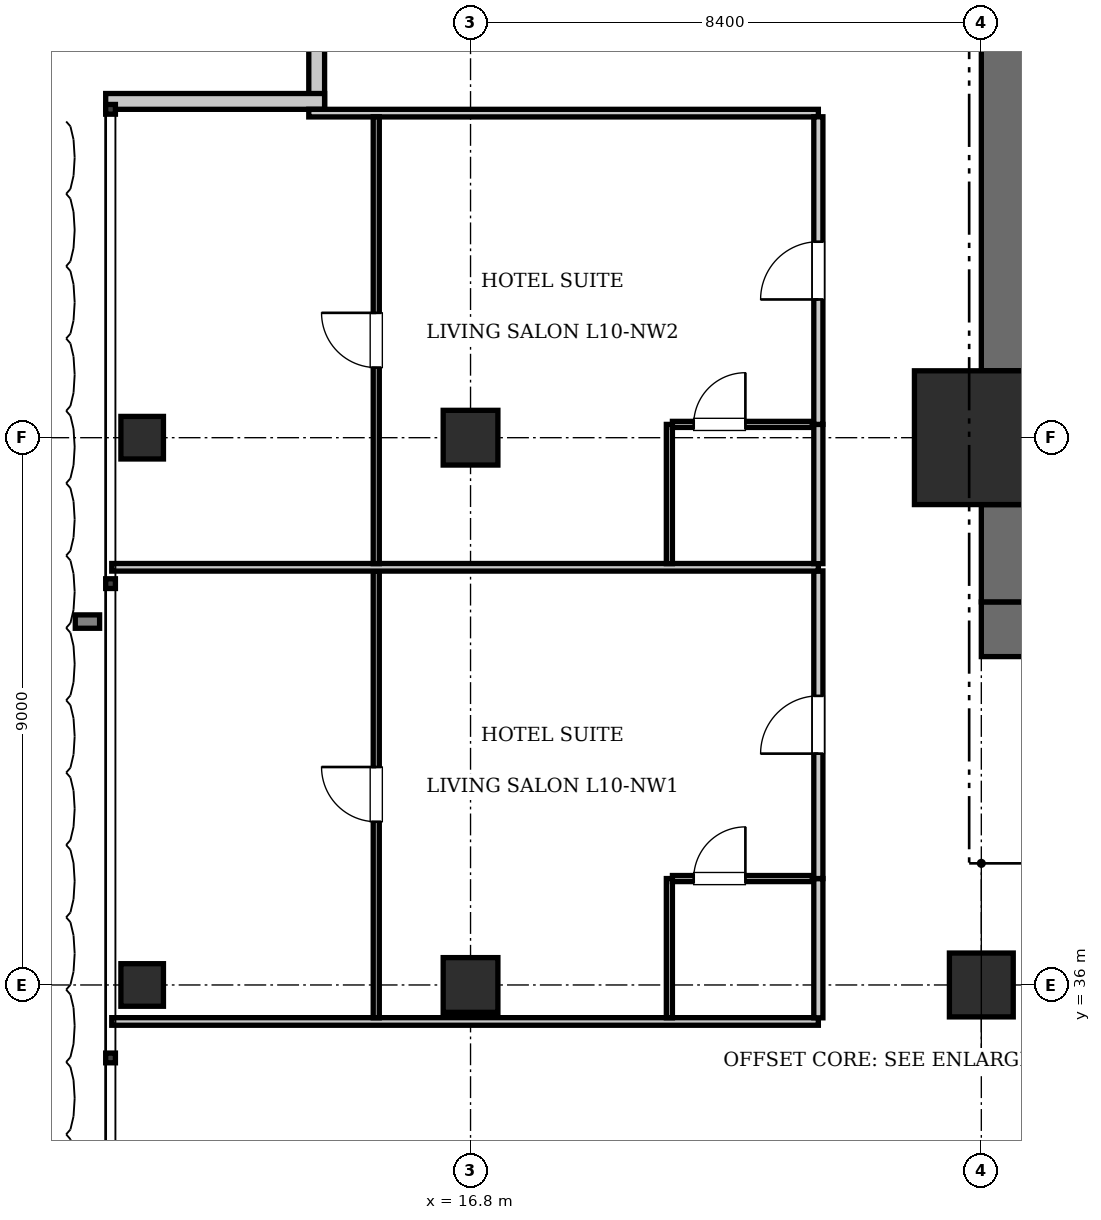
"""IFC4 building model, lengths in metres.
Left out: names, types, materials, properties, quantities, classifications, styles, units other than length and angle.
Written with IfcOpenShell. Run it as: python <this file> out.ifc"""

import sys

from ifc_helpers import new_model, si_unit, direction, frame, frame_2d, origin, origin_2d, place, context, subcontext, project, spatial, rectangle, i_section, extrude, element, fill, save


model = new_model("IFC4")
c1 = context("Model", 3, precision=1e-05, world=origin(), true_north=direction((0.0, 1.0)))
c2 = subcontext(c1, "Body", "Model", "MODEL_VIEW")
j1 = project(units=[si_unit("LENGTHUNIT", "METRE"), si_unit("PLANEANGLEUNIT", "RADIAN")], contexts=[c1])
p1 = place(None, origin())
s1 = spatial("IfcSite", under=j1, at=p1, CompositionType="ELEMENT")
p2 = place(p1, origin())
s2 = spatial("IfcBuilding", under=s1, at=p2, CompositionType="ELEMENT")
p3 = place(p2, frame((0.0, 0.0, 46.2)))
s3 = spatial("IfcBuildingStorey", under=s2, at=p3, CompositionType="ELEMENT", Elevation=46.2)
p4 = place(p3, frame((25.2, 45.0, 0.0), z_axis=(0.0, 0.0, 1.0), x_axis=(1.0, 0.0, 0.0)))
e1 = element("IfcColumn", 1, at=p4, inside=s3, PredefinedType="COLUMN", context=c2, shape_type="SweptSolid", body=[
    extrude(rectangle(XDim=2.2, YDim=2.2, at=origin_2d()), origin(), (0.0, 0.0, 1.0), 3.85),
])
p5 = place(p3, frame((25.2, 41.85, 0.0), z_axis=(0.0, 0.0, 1.0), x_axis=(1.0, 0.0, 0.0)))
e2 = element("IfcWall", 2, at=p5, inside=s3, PredefinedType="SHEAR", context=c2, shape_type="SweptSolid", body=[
    extrude(rectangle(XDim=6.8, YDim=0.9, at=frame_2d((3.4, 0.0))), origin(), (0.0, 0.0, 1.0), 3.85),
])
p6 = place(p5, frame((1.65, 0.0, 0.0)))
e3 = element("IfcOpeningElement", 3, at=p6, cuts=e2, PredefinedType="OPENING", context=c2, shape_type="SweptSolid", body=[
    extrude(rectangle(XDim=1.15, YDim=2.15, at=frame_2d((0.575, 1.075))), frame((0.0, 0.46, 0.0), z_axis=(0.0, -1.0, 0.0), x_axis=(1.0, 0.0, 0.0)), (0.0, 0.0, 1.0), 0.92),
])
p7 = place(p5, frame((5.15, 0.0, 0.0)))
e4 = element("IfcOpeningElement", 4, at=p7, cuts=e2, PredefinedType="OPENING", context=c2, shape_type="SweptSolid", body=[
    extrude(rectangle(XDim=1.1, YDim=2.2, at=frame_2d((0.55, 1.1))), frame((0.0, 0.46, 0.0), z_axis=(0.0, -1.0, 0.0), x_axis=(1.0, 0.0, 0.0)), (0.0, 0.0, 1.0), 0.92),
])
p8 = place(p3, frame((25.65, 42.3, 0.0), z_axis=(0.0, 0.0, 1.0), x_axis=(0.0, 1.0, 0.0)))
e5 = element("IfcWall", 5, at=p8, inside=s3, PredefinedType="SHEAR", context=c2, shape_type="SweptSolid", body=[
    extrude(rectangle(XDim=1.6, YDim=0.9, at=frame_2d((0.8, 0.0))), origin(), (0.0, 0.0, 1.0), 3.85),
])
p9 = place(p3, frame((25.65, 46.1, 0.0), z_axis=(0.0, 0.0, 1.0), x_axis=(0.0, 1.0, 0.0)))
e6 = element("IfcWall", 6, at=p9, inside=s3, PredefinedType="SHEAR", context=c2, shape_type="SweptSolid", body=[
    extrude(rectangle(XDim=7.0, YDim=0.9, at=frame_2d((3.5, 0.0))), origin(), (0.0, 0.0, 1.0), 3.85),
])
p10 = place(p3, frame((25.2, 36.0, 0.0), z_axis=(0.0, 0.0, 1.0), x_axis=(1.0, 0.0, 0.0)))
e7 = element("IfcColumn", 7, at=p10, inside=s3, PredefinedType="COLUMN", context=c2, shape_type="SweptSolid", body=[
    extrude(rectangle(XDim=1.05, YDim=1.05, at=origin_2d()), origin(), (0.0, 0.0, 1.0), 3.85),
])
for number, where, z_axis, x_axis in (
    (8, (16.8, 36.0, 0.0), (0.0, 0.0, 1.0), (1.0, 0.0, 0.0)),
    (9, (16.8, 45.0, 0.0), (0.0, 0.0, 1.0), (1.0, 0.0, 0.0)),
):
    element("IfcColumn", number, at=place(p3, frame(where, z_axis=z_axis, x_axis=x_axis)), inside=s3, PredefinedType="COLUMN", context=c2, shape_type="SweptSolid", body=[
        extrude(rectangle(XDim=0.9, YDim=0.9, at=origin_2d()), origin(), (0.0, 0.0, 1.0), 3.85),
    ])
for number, where, z_axis, x_axis in (
    (10, (11.4, 36.0, 0.0), (0.0, 0.0, 1.0), (1.0, 0.0, 0.0)),
    (11, (11.4, 45.0, 0.0), (0.0, 0.0, 1.0), (1.0, 0.0, 0.0)),
):
    element("IfcColumn", number, at=place(p3, frame(where, z_axis=z_axis, x_axis=x_axis)), inside=s3, PredefinedType="COLUMN", context=c2, shape_type="SweptSolid", body=[
        extrude(i_section(OverallWidth=0.7, OverallDepth=0.7, WebThickness=0.028, FlangeThickness=0.044, at=origin_2d()), origin(), (0.0, 0.0, 1.0), 3.85),
    ])
p11 = place(p3, frame((14.27, 50.4, 0.0), z_axis=(0.0, 0.0, 1.0), x_axis=(0.0, 1.0, 0.0)))
e12 = element("IfcWall", 12, at=p11, inside=s3, PredefinedType="SOLIDWALL", context=c2, shape_type="SweptSolid", body=[
    extrude(rectangle(XDim=3.6, YDim=0.26, at=frame_2d((1.8, 0.0))), origin(), (0.0, 0.0, 1.0), 3.61),
])
p12 = place(p3, frame((10.8, 50.53, 0.0), z_axis=(0.0, 0.0, 1.0), x_axis=(1.0, 0.0, 0.0)))
e13 = element("IfcWall", 13, at=p12, inside=s3, PredefinedType="SOLIDWALL", context=c2, shape_type="SweptSolid", body=[
    extrude(rectangle(XDim=3.6, YDim=0.26, at=frame_2d((1.8, 0.0))), origin(), (0.0, 0.0, 1.0), 3.61),
])
p13 = place(p3, frame((10.9, 35.4, 0.0), z_axis=(0.0, 0.0, 1.0), x_axis=(1.0, 0.0, 0.0)))
e14 = element("IfcWall", 14, at=p13, inside=s3, PredefinedType="PARTITIONING", context=c2, shape_type="SweptSolid", body=[
    extrude(rectangle(XDim=11.62, YDim=0.125, at=frame_2d((5.81, 0.0))), origin(), (0.0, 0.0, 1.0), 3.61),
])
p14 = place(p3, frame((14.14, 50.337, 0.0), z_axis=(0.0, 0.0, 1.0), x_axis=(1.0, 0.0, 0.0)))
e15 = element("IfcWall", 15, at=p14, inside=s3, PredefinedType="PARTITIONING", context=c2, shape_type="SweptSolid", body=[
    extrude(rectangle(XDim=8.38, YDim=0.125, at=frame_2d((4.19, 0.0))), origin(), (0.0, 0.0, 1.0), 3.61),
])
p15 = place(p3, frame((22.52, 35.46, 0.0), z_axis=(0.0, 0.0, 1.0), x_axis=(0.0, 1.0, 0.0)))
e16 = element("IfcWall", 16, at=p15, inside=s3, PredefinedType="PARTITIONING", context=c2, shape_type="SweptSolid", body=[
    extrude(rectangle(XDim=2.29, YDim=0.15, at=frame_2d((1.145, 0.0))), origin(), (0.0, 0.0, 1.0), 3.61),
])
p16 = place(p3, frame((22.52, 37.75, 0.0), z_axis=(0.0, 0.0, 1.0), x_axis=(0.0, 1.0, 0.0)))
e17 = element("IfcWall", 17, at=p16, inside=s3, PredefinedType="PARTITIONING", context=c2, shape_type="SweptSolid", body=[
    extrude(rectangle(XDim=5.059, YDim=0.15, at=frame_2d((2.529, 0.0))), origin(), (0.0, 0.0, 1.0), 3.61),
])
p17 = place(p16, frame((2.054, 0.0, 0.0)))
e18 = element("IfcOpeningElement", 18, at=p17, cuts=e17, PredefinedType="OPENING", context=c2, shape_type="SweptSolid", body=[
    extrude(rectangle(XDim=0.95, YDim=2.15, at=frame_2d((0.475, 1.075))), frame((0.0, 0.085, 0.0), z_axis=(0.0, -1.0, 0.0), x_axis=(1.0, 0.0, 0.0)), (0.0, 0.0, 1.0), 0.17),
])
p18 = place(p3, frame((20.07, 35.46, 0.0), z_axis=(0.0, 0.0, 1.0), x_axis=(0.0, 1.0, 0.0)))
e19 = element("IfcWall", 19, at=p18, inside=s3, PredefinedType="PARTITIONING", context=c2, shape_type="SweptSolid", body=[
    extrude(rectangle(XDim=2.29, YDim=0.1, at=frame_2d((1.145, 0.0))), origin(), (0.0, 0.0, 1.0), 3.61),
])
p19 = place(p3, frame((20.12, 37.75, 0.0), z_axis=(0.0, 0.0, 1.0), x_axis=(1.0, 0.0, 0.0)))
e20 = element("IfcWall", 20, at=p19, inside=s3, PredefinedType="PARTITIONING", context=c2, shape_type="SweptSolid", body=[
    extrude(rectangle(XDim=2.3, YDim=0.1, at=frame_2d((1.15, 0.0))), origin(), (0.0, 0.0, 1.0), 3.61),
])
p20 = place(p19, frame((0.35, 0.0, 0.0)))
e21 = element("IfcOpeningElement", 21, at=p20, cuts=e20, PredefinedType="OPENING", context=c2, shape_type="SweptSolid", body=[
    extrude(rectangle(XDim=0.85, YDim=2.1, at=frame_2d((0.425, 1.05))), frame((0.0, 0.06, 0.0), z_axis=(0.0, -1.0, 0.0), x_axis=(1.0, 0.0, 0.0)), (0.0, 0.0, 1.0), 0.12),
])
p21 = place(p3, frame((15.25, 35.46, 0.0), z_axis=(0.0, 0.0, 1.0), x_axis=(0.0, 1.0, 0.0)))
e22 = element("IfcWall", 22, at=p21, inside=s3, PredefinedType="PARTITIONING", context=c2, shape_type="SweptSolid", body=[
    extrude(rectangle(XDim=7.349, YDim=0.1, at=frame_2d((3.674, 0.0))), origin(), (0.0, 0.0, 1.0), 3.61),
])
p22 = place(p21, frame((3.224, 0.0, 0.0)))
e23 = element("IfcOpeningElement", 23, at=p22, cuts=e22, PredefinedType="OPENING", context=c2, shape_type="SweptSolid", body=[
    extrude(rectangle(XDim=0.9, YDim=2.1, at=frame_2d((0.45, 1.05))), frame((0.0, 0.06, 0.0), z_axis=(0.0, -1.0, 0.0), x_axis=(1.0, 0.0, 0.0)), (0.0, 0.0, 1.0), 0.12),
])
p23 = place(p3, frame((10.9, 42.869, 0.0), z_axis=(0.0, 0.0, 1.0), x_axis=(1.0, 0.0, 0.0)))
e24 = element("IfcWall", 24, at=p23, inside=s3, PredefinedType="PARTITIONING", context=c2, shape_type="SweptSolid", body=[
    extrude(rectangle(XDim=11.62, YDim=0.125, at=frame_2d((5.81, 0.0))), origin(), (0.0, 0.0, 1.0), 3.61),
])
p24 = place(p3, frame((22.52, 42.929, 0.0), z_axis=(0.0, 0.0, 1.0), x_axis=(0.0, 1.0, 0.0)))
e25 = element("IfcWall", 25, at=p24, inside=s3, PredefinedType="PARTITIONING", context=c2, shape_type="SweptSolid", body=[
    extrude(rectangle(XDim=2.29, YDim=0.15, at=frame_2d((1.145, 0.0))), origin(), (0.0, 0.0, 1.0), 3.61),
])
p25 = place(p3, frame((22.52, 45.219, 0.0), z_axis=(0.0, 0.0, 1.0), x_axis=(0.0, 1.0, 0.0)))
e26 = element("IfcWall", 26, at=p25, inside=s3, PredefinedType="PARTITIONING", context=c2, shape_type="SweptSolid", body=[
    extrude(rectangle(XDim=5.059, YDim=0.15, at=frame_2d((2.529, 0.0))), origin(), (0.0, 0.0, 1.0), 3.61),
])
p26 = place(p25, frame((2.054, 0.0, 0.0)))
e27 = element("IfcOpeningElement", 27, at=p26, cuts=e26, PredefinedType="OPENING", context=c2, shape_type="SweptSolid", body=[
    extrude(rectangle(XDim=0.95, YDim=2.15, at=frame_2d((0.475, 1.075))), frame((0.0, 0.085, 0.0), z_axis=(0.0, -1.0, 0.0), x_axis=(1.0, 0.0, 0.0)), (0.0, 0.0, 1.0), 0.17),
])
p27 = place(p3, frame((20.07, 42.929, 0.0), z_axis=(0.0, 0.0, 1.0), x_axis=(0.0, 1.0, 0.0)))
e28 = element("IfcWall", 28, at=p27, inside=s3, PredefinedType="PARTITIONING", context=c2, shape_type="SweptSolid", body=[
    extrude(rectangle(XDim=2.29, YDim=0.1, at=frame_2d((1.145, 0.0))), origin(), (0.0, 0.0, 1.0), 3.61),
])
p28 = place(p3, frame((20.12, 45.219, 0.0), z_axis=(0.0, 0.0, 1.0), x_axis=(1.0, 0.0, 0.0)))
e29 = element("IfcWall", 29, at=p28, inside=s3, PredefinedType="PARTITIONING", context=c2, shape_type="SweptSolid", body=[
    extrude(rectangle(XDim=2.3, YDim=0.1, at=frame_2d((1.15, 0.0))), origin(), (0.0, 0.0, 1.0), 3.61),
])
p29 = place(p28, frame((0.35, 0.0, 0.0)))
e30 = element("IfcOpeningElement", 30, at=p29, cuts=e29, PredefinedType="OPENING", context=c2, shape_type="SweptSolid", body=[
    extrude(rectangle(XDim=0.85, YDim=2.1, at=frame_2d((0.425, 1.05))), frame((0.0, 0.06, 0.0), z_axis=(0.0, -1.0, 0.0), x_axis=(1.0, 0.0, 0.0)), (0.0, 0.0, 1.0), 0.12),
])
p30 = place(p3, frame((15.25, 42.929, 0.0), z_axis=(0.0, 0.0, 1.0), x_axis=(0.0, 1.0, 0.0)))
e31 = element("IfcWall", 31, at=p30, inside=s3, PredefinedType="PARTITIONING", context=c2, shape_type="SweptSolid", body=[
    extrude(rectangle(XDim=7.349, YDim=0.1, at=frame_2d((3.674, 0.0))), origin(), (0.0, 0.0, 1.0), 3.61),
])
p31 = place(p30, frame((3.224, 0.0, 0.0)))
e32 = element("IfcOpeningElement", 32, at=p31, cuts=e31, PredefinedType="OPENING", context=c2, shape_type="SweptSolid", body=[
    extrude(rectangle(XDim=0.9, YDim=2.1, at=frame_2d((0.45, 1.05))), frame((0.0, 0.06, 0.0), z_axis=(0.0, -1.0, 0.0), x_axis=(1.0, 0.0, 0.0)), (0.0, 0.0, 1.0), 0.12),
])
p32 = place(p20, origin())
e33 = element("IfcDoor", 33, at=p32, inside=s3, OperationType="SINGLE_SWING_RIGHT", PredefinedType="DOOR", context=c2, shape_type="SweptSolid", body=[
    extrude(rectangle(XDim=0.85, YDim=2.1, at=frame_2d((0.425, 1.05))), frame((0.0, 0.025, 0.0), z_axis=(0.0, -1.0, 0.0), x_axis=(1.0, 0.0, 0.0)), (0.0, 0.0, 1.0), 0.05),
])
fill(e21, e33)
p33 = place(p17, origin())
e34 = element("IfcDoor", 34, at=p33, inside=s3, OperationType="SINGLE_SWING_LEFT", PredefinedType="DOOR", context=c2, shape_type="SweptSolid", body=[
    extrude(rectangle(XDim=0.95, YDim=2.15, at=frame_2d((0.475, 1.075))), frame((0.0, 0.025, 0.0), z_axis=(0.0, -1.0, 0.0), x_axis=(1.0, 0.0, 0.0)), (0.0, 0.0, 1.0), 0.05),
])
fill(e18, e34)
p34 = place(p22, origin())
e35 = element("IfcDoor", 35, at=p34, inside=s3, OperationType="SINGLE_SWING_RIGHT", PredefinedType="DOOR", context=c2, shape_type="SweptSolid", body=[
    extrude(rectangle(XDim=0.9, YDim=2.1, at=frame_2d((0.45, 1.05))), frame((0.0, 0.025, 0.0), z_axis=(0.0, -1.0, 0.0), x_axis=(1.0, 0.0, 0.0)), (0.0, 0.0, 1.0), 0.05),
])
fill(e23, e35)
p35 = place(p29, origin())
e36 = element("IfcDoor", 36, at=p35, inside=s3, OperationType="SINGLE_SWING_RIGHT", PredefinedType="DOOR", context=c2, shape_type="SweptSolid", body=[
    extrude(rectangle(XDim=0.85, YDim=2.1, at=frame_2d((0.425, 1.05))), frame((0.0, 0.025, 0.0), z_axis=(0.0, -1.0, 0.0), x_axis=(1.0, 0.0, 0.0)), (0.0, 0.0, 1.0), 0.05),
])
fill(e30, e36)
p36 = place(p26, origin())
e37 = element("IfcDoor", 37, at=p36, inside=s3, OperationType="SINGLE_SWING_LEFT", PredefinedType="DOOR", context=c2, shape_type="SweptSolid", body=[
    extrude(rectangle(XDim=0.95, YDim=2.15, at=frame_2d((0.475, 1.075))), frame((0.0, 0.025, 0.0), z_axis=(0.0, -1.0, 0.0), x_axis=(1.0, 0.0, 0.0)), (0.0, 0.0, 1.0), 0.05),
])
fill(e27, e37)
p37 = place(p31, origin())
e38 = element("IfcDoor", 38, at=p37, inside=s3, OperationType="SINGLE_SWING_RIGHT", PredefinedType="DOOR", context=c2, shape_type="SweptSolid", body=[
    extrude(rectangle(XDim=0.9, YDim=2.1, at=frame_2d((0.45, 1.05))), frame((0.0, 0.025, 0.0), z_axis=(0.0, -1.0, 0.0), x_axis=(1.0, 0.0, 0.0)), (0.0, 0.0, 1.0), 0.05),
])
fill(e32, e38)
save(model, sys.argv[1])
